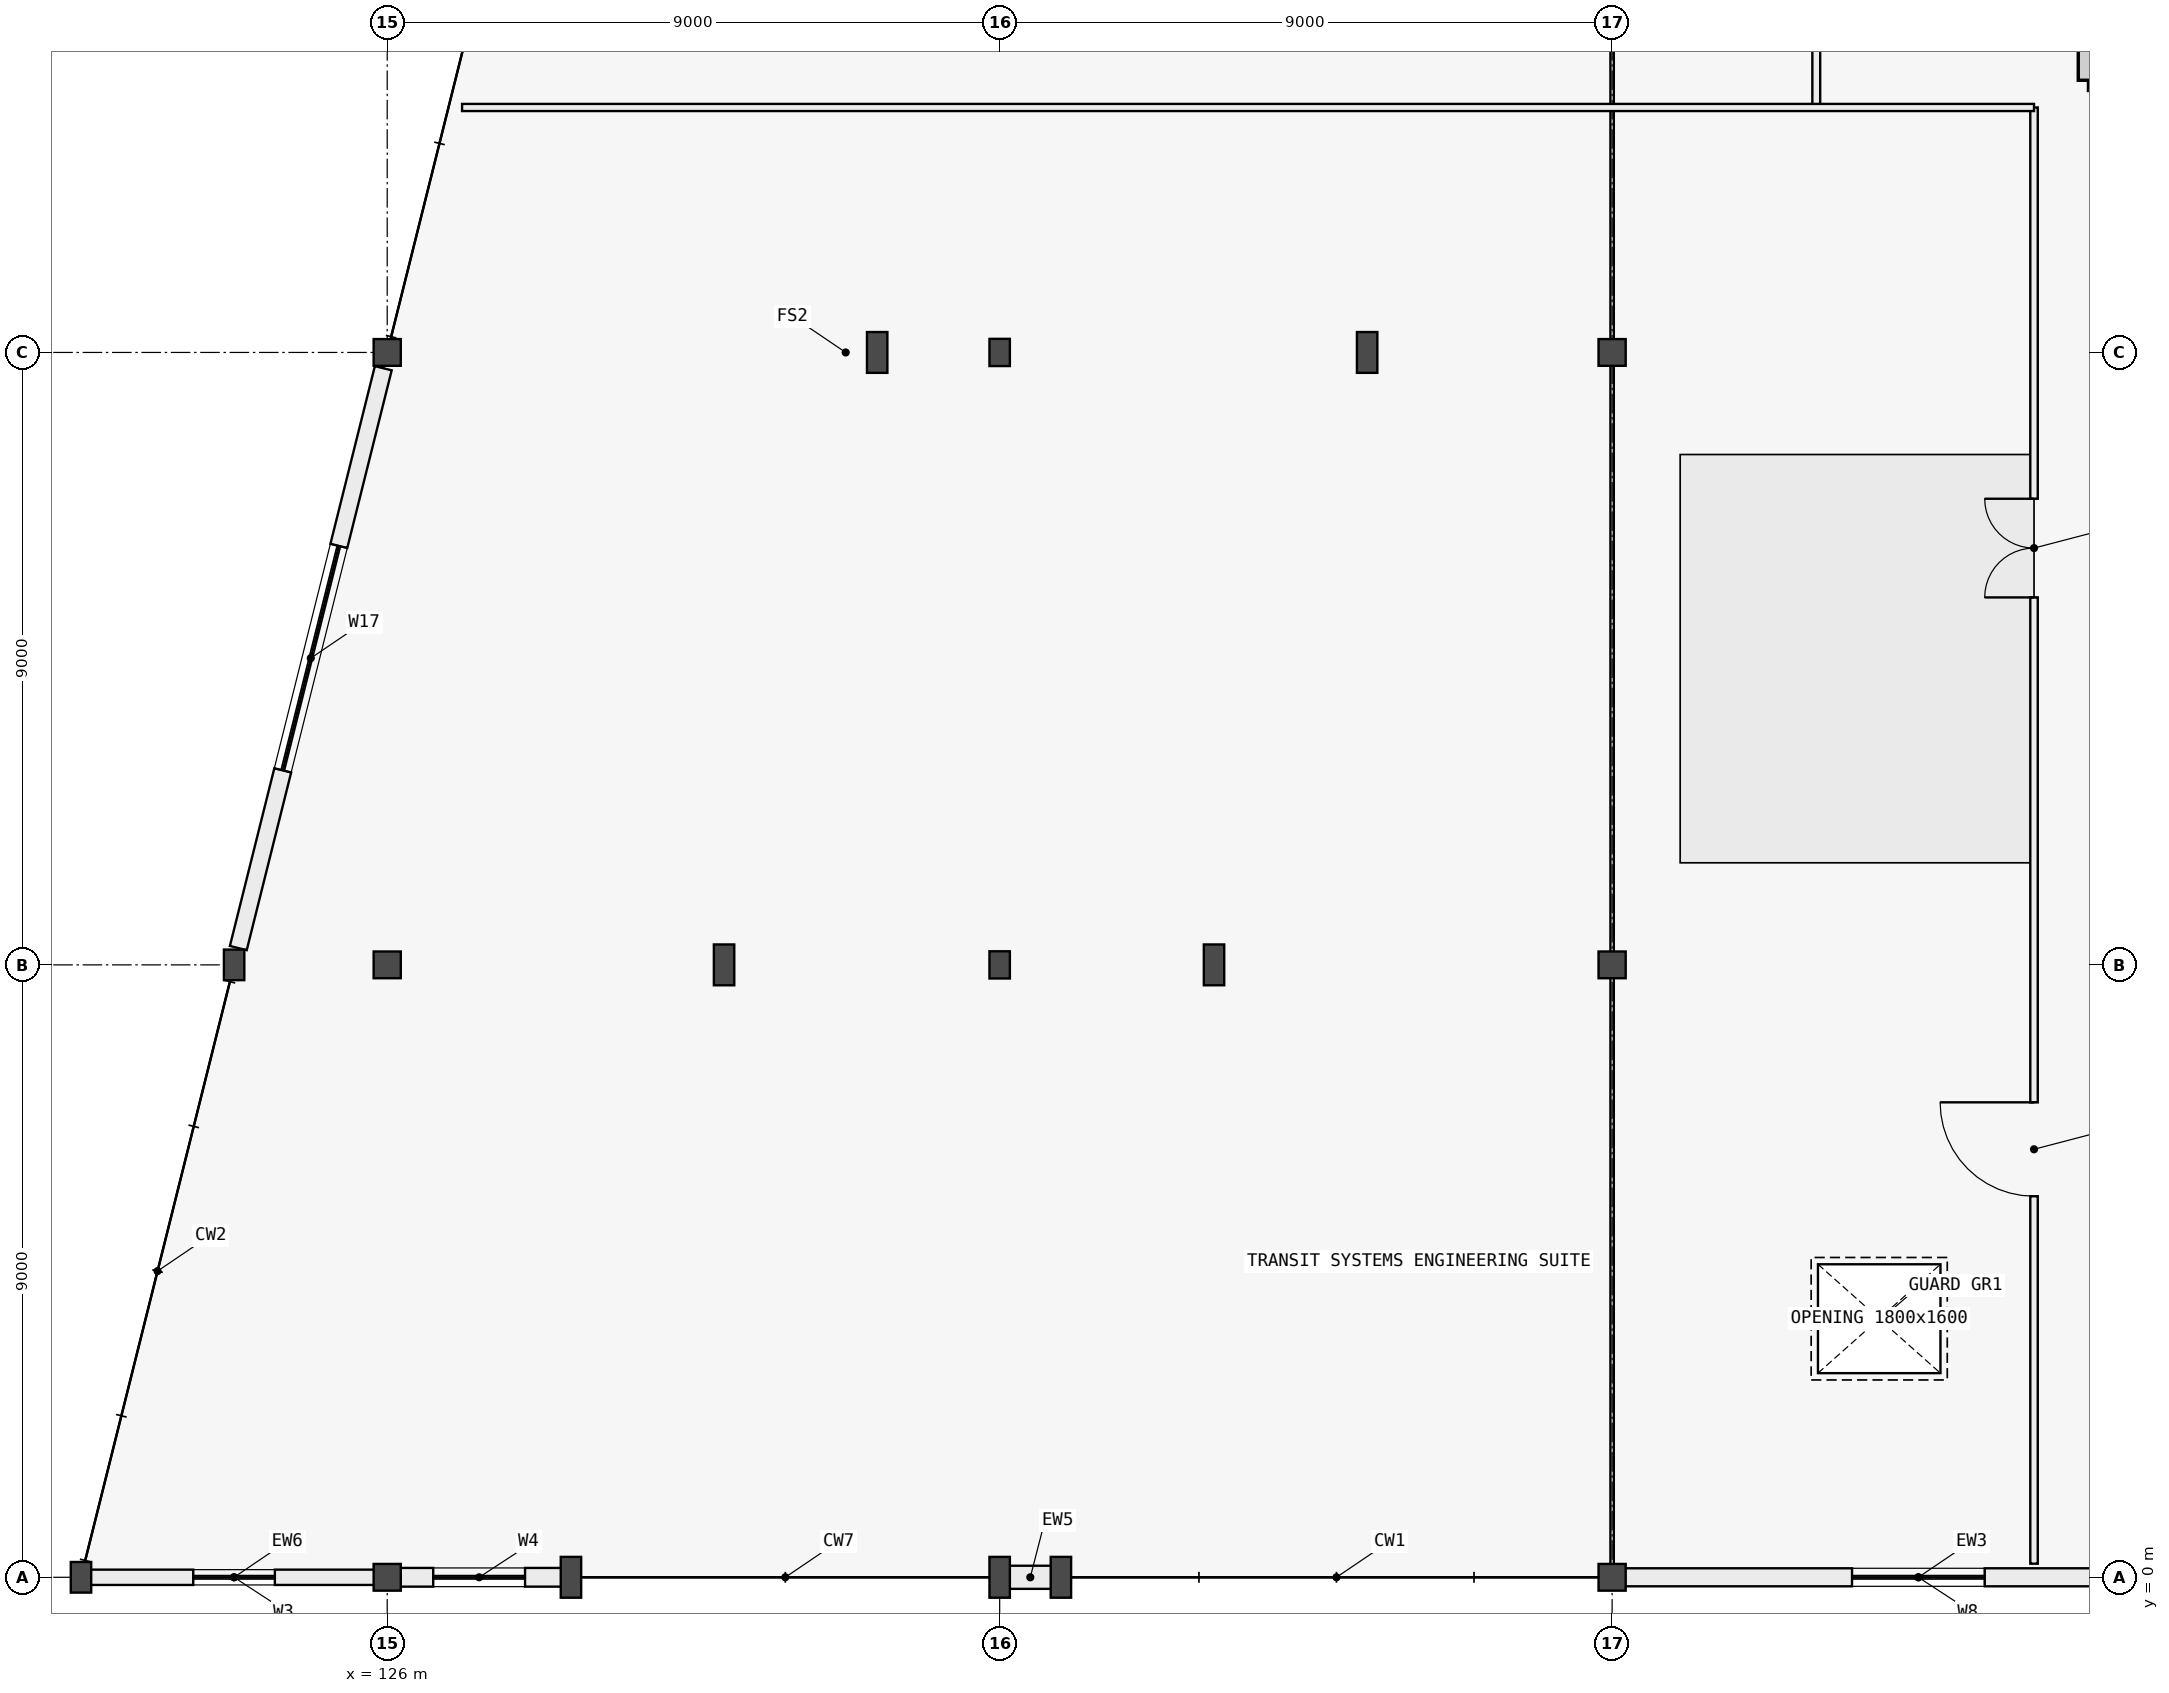
"""IFC4 building model, lengths in metres.
Left out: names, types, materials, properties, quantities, classifications, styles, units other than length and angle.
Written with IfcOpenShell. Run it as: python <this file> out.ifc"""

import sys

from ifc_helpers import new_model, si_unit, direction, frame, frame_2d, origin, origin_2d, place, context, subcontext, project, spatial, rectangle, i_section, extrude, element, fill, save


model = new_model("IFC4")
c1 = context("Model", 3, precision=1e-05, world=origin(), true_north=direction((0.0, 1.0)))
c2 = subcontext(c1, "Body", "Model", "MODEL_VIEW")
j1 = project(units=[si_unit("LENGTHUNIT", "METRE"), si_unit("PLANEANGLEUNIT", "RADIAN")], contexts=[c1])
p1 = place(None, origin())
s1 = spatial("IfcSite", under=j1, at=p1, CompositionType="ELEMENT")
p2 = place(p1, origin())
s2 = spatial("IfcBuilding", under=s1, at=p2, CompositionType="ELEMENT")
p3 = place(p2, frame((0.0, 0.0, 16.8)))
s3 = spatial("IfcBuildingStorey", under=s2, at=p3, CompositionType="ELEMENT", Elevation=16.8)
p4 = place(p3, frame((121.5, 0.0, 0.0), z_axis=(0.0, 0.0, 1.0), x_axis=(1.0, 0.0, 0.0)))
e1 = element("IfcColumn", 1, at=p4, inside=s3, PredefinedType="COLUMN", context=c2, shape_type="SweptSolid", body=[
    extrude(i_section(OverallWidth=0.3, OverallDepth=0.45, WebThickness=0.014, FlangeThickness=0.026, FilletRadius=0.027, at=origin_2d()), origin(), (0.0, 0.0, 1.0), 4.2),
])
p5 = place(p3, frame((126.0, 0.0, 0.0), z_axis=(0.0, 0.0, 1.0), x_axis=(1.0, 0.0, 0.0)))
e2 = element("IfcColumn", 2, at=p5, inside=s3, PredefinedType="COLUMN", context=c2, shape_type="SweptSolid", body=[
    extrude(i_section(OverallWidth=0.399, OverallDepth=0.393, WebThickness=0.018, FlangeThickness=0.028, FilletRadius=0.015, at=origin_2d()), origin(), (0.0, 0.0, 1.0), 4.2),
])
for number, where, z_axis, x_axis in (
    (3, (128.7, 0.0, 0.0), (0.0, 0.0, 1.0), (1.0, 0.0, 0.0)),
    (4, (135.0, 0.0, 0.0), (0.0, 0.0, 1.0), (1.0, 0.0, 0.0)),
    (5, (135.9, 0.0, 0.0), (0.0, 0.0, 1.0), (1.0, 0.0, 0.0)),
):
    element("IfcColumn", number, at=place(p3, frame(where, z_axis=z_axis, x_axis=x_axis)), inside=s3, PredefinedType="COLUMN", context=c2, shape_type="SweptSolid", body=[
        extrude(i_section(OverallWidth=0.3, OverallDepth=0.6, WebThickness=0.015, FlangeThickness=0.03, FilletRadius=0.027, at=origin_2d()), origin(), (0.0, 0.0, 1.0), 4.2),
    ])
p6 = place(p3, frame((144.0, 0.0, 0.0), z_axis=(0.0, 0.0, 1.0), x_axis=(1.0, 0.0, 0.0)))
e6 = element("IfcColumn", 6, at=p6, inside=s3, PredefinedType="COLUMN", context=c2, shape_type="SweptSolid", body=[
    extrude(i_section(OverallWidth=0.399, OverallDepth=0.393, WebThickness=0.018, FlangeThickness=0.028, FilletRadius=0.015, at=origin_2d()), origin(), (0.0, 0.0, 1.0), 4.2),
])
p7 = place(p3, frame((123.75, 9.0, 0.0), z_axis=(0.0, 0.0, 1.0), x_axis=(1.0, 0.0, 0.0)))
e7 = element("IfcColumn", 7, at=p7, inside=s3, PredefinedType="COLUMN", context=c2, shape_type="SweptSolid", body=[
    extrude(i_section(OverallWidth=0.3, OverallDepth=0.45, WebThickness=0.014, FlangeThickness=0.026, FilletRadius=0.027, at=origin_2d()), origin(), (0.0, 0.0, 1.0), 4.2),
])
p8 = place(p3, frame((126.0, 9.0, 0.0), z_axis=(0.0, 0.0, 1.0), x_axis=(1.0, 0.0, 0.0)))
e8 = element("IfcColumn", 8, at=p8, inside=s3, PredefinedType="COLUMN", context=c2, shape_type="SweptSolid", body=[
    extrude(i_section(OverallWidth=0.399, OverallDepth=0.393, WebThickness=0.018, FlangeThickness=0.028, FilletRadius=0.015, at=origin_2d()), origin(), (0.0, 0.0, 1.0), 4.2),
])
p9 = place(p3, frame((130.95, 9.0, 0.0), z_axis=(0.0, 0.0, 1.0), x_axis=(1.0, 0.0, 0.0)))
e9 = element("IfcColumn", 9, at=p9, inside=s3, PredefinedType="COLUMN", context=c2, shape_type="SweptSolid", body=[
    extrude(i_section(OverallWidth=0.3, OverallDepth=0.6, WebThickness=0.015, FlangeThickness=0.03, FilletRadius=0.027, at=origin_2d()), origin(), (0.0, 0.0, 1.0), 4.2),
])
p10 = place(p3, frame((135.0, 9.0, 0.0), z_axis=(0.0, 0.0, 1.0), x_axis=(1.0, 0.0, 0.0)))
e10 = element("IfcColumn", 10, at=p10, inside=s3, PredefinedType="COLUMN", context=c2, shape_type="SweptSolid", body=[
    extrude(i_section(OverallWidth=0.3, OverallDepth=0.4, WebThickness=0.013, FlangeThickness=0.024, FilletRadius=0.027, at=origin_2d()), origin(), (0.0, 0.0, 1.0), 4.2),
])
p11 = place(p3, frame((138.15, 9.0, 0.0), z_axis=(0.0, 0.0, 1.0), x_axis=(1.0, 0.0, 0.0)))
e11 = element("IfcColumn", 11, at=p11, inside=s3, PredefinedType="COLUMN", context=c2, shape_type="SweptSolid", body=[
    extrude(i_section(OverallWidth=0.3, OverallDepth=0.6, WebThickness=0.015, FlangeThickness=0.03, FilletRadius=0.027, at=origin_2d()), origin(), (0.0, 0.0, 1.0), 4.2),
])
for number, where, z_axis, x_axis in (
    (12, (144.0, 9.0, 0.0), (0.0, 0.0, 1.0), (1.0, 0.0, 0.0)),
    (13, (126.0, 18.0, 0.0), (0.0, 0.0, 1.0), (1.0, 0.0, 0.0)),
):
    element("IfcColumn", number, at=place(p3, frame(where, z_axis=z_axis, x_axis=x_axis)), inside=s3, PredefinedType="COLUMN", context=c2, shape_type="SweptSolid", body=[
        extrude(i_section(OverallWidth=0.399, OverallDepth=0.393, WebThickness=0.018, FlangeThickness=0.028, FilletRadius=0.015, at=origin_2d()), origin(), (0.0, 0.0, 1.0), 4.2),
    ])
p12 = place(p3, frame((133.2, 18.0, 0.0), z_axis=(0.0, 0.0, 1.0), x_axis=(1.0, 0.0, 0.0)))
e14 = element("IfcColumn", 14, at=p12, inside=s3, PredefinedType="COLUMN", context=c2, shape_type="SweptSolid", body=[
    extrude(i_section(OverallWidth=0.3, OverallDepth=0.6, WebThickness=0.015, FlangeThickness=0.03, FilletRadius=0.027, at=origin_2d()), origin(), (0.0, 0.0, 1.0), 4.2),
])
p13 = place(p3, frame((135.0, 18.0, 0.0), z_axis=(0.0, 0.0, 1.0), x_axis=(1.0, 0.0, 0.0)))
e15 = element("IfcColumn", 15, at=p13, inside=s3, PredefinedType="COLUMN", context=c2, shape_type="SweptSolid", body=[
    extrude(i_section(OverallWidth=0.3, OverallDepth=0.4, WebThickness=0.013, FlangeThickness=0.024, FilletRadius=0.027, at=origin_2d()), origin(), (0.0, 0.0, 1.0), 4.2),
])
p14 = place(p3, frame((140.4, 18.0, 0.0), z_axis=(0.0, 0.0, 1.0), x_axis=(1.0, 0.0, 0.0)))
e16 = element("IfcColumn", 16, at=p14, inside=s3, PredefinedType="COLUMN", context=c2, shape_type="SweptSolid", body=[
    extrude(i_section(OverallWidth=0.3, OverallDepth=0.6, WebThickness=0.015, FlangeThickness=0.03, FilletRadius=0.027, at=origin_2d()), origin(), (0.0, 0.0, 1.0), 4.2),
])
p15 = place(p3, frame((144.0, 18.0, 0.0), z_axis=(0.0, 0.0, 1.0), x_axis=(1.0, 0.0, 0.0)))
e17 = element("IfcColumn", 17, at=p15, inside=s3, PredefinedType="COLUMN", context=c2, shape_type="SweptSolid", body=[
    extrude(i_section(OverallWidth=0.399, OverallDepth=0.393, WebThickness=0.018, FlangeThickness=0.028, FilletRadius=0.015, at=origin_2d()), origin(), (0.0, 0.0, 1.0), 4.2),
])
p16 = place(p3, frame((121.507, 0.0, 0.0), z_axis=(0.0, 0.0, 1.0), x_axis=(1.0, 0.0, 0.0)))
e18 = element("IfcWall", 18, at=p16, inside=s3, PredefinedType="STANDARD", context=c2, shape_type="SweptSolid", body=[
    extrude(rectangle(XDim=4.484, YDim=0.225, at=frame_2d((2.242, 0.0))), origin(), (0.0, 0.0, 1.0), 3.665),
])
p17 = place(p16, frame((1.642, 0.0, 0.95)))
e19 = element("IfcOpeningElement", 19, at=p17, cuts=e18, PredefinedType="OPENING", context=c2, shape_type="SweptSolid", body=[
    extrude(rectangle(XDim=1.2, YDim=1.35, at=frame_2d((0.6, 0.675))), frame((0.0, 0.123, 0.0), z_axis=(0.0, -1.0, 0.0), x_axis=(1.0, 0.0, 0.0)), (0.0, 0.0, 1.0), 0.245),
])
p18 = place(p3, frame((126.009, 0.0, 0.0), z_axis=(0.0, 0.0, 1.0), x_axis=(1.0, 0.0, 0.0)))
e20 = element("IfcWall", 20, at=p18, inside=s3, PredefinedType="POLYGONAL", context=c2, shape_type="SweptSolid", body=[
    extrude(rectangle(XDim=2.684, YDim=0.275, at=frame_2d((1.342, 0.0))), origin(), (0.0, 0.0, 1.0), 3.66),
])
p19 = place(p18, frame((0.667, 0.0, 0.95)))
e21 = element("IfcOpeningElement", 21, at=p19, cuts=e20, PredefinedType="OPENING", context=c2, shape_type="SweptSolid", body=[
    extrude(rectangle(XDim=1.35, YDim=1.4, at=frame_2d((0.675, 0.7))), frame((0.0, 0.147, 0.0), z_axis=(0.0, -1.0, 0.0), x_axis=(1.0, 0.0, 0.0)), (0.0, 0.0, 1.0), 0.295),
])
p20 = place(p3, frame((135.008, 0.0, 0.0), z_axis=(0.0, 0.0, 1.0), x_axis=(1.0, 0.0, 0.0)))
e22 = element("IfcWall", 22, at=p20, inside=s3, PredefinedType="STANDARD", context=c2, shape_type="SweptSolid", body=[
    extrude(rectangle(XDim=0.885, YDim=0.34, at=frame_2d((0.442, 0.0))), origin(), (0.0, 0.0, 1.0), 3.66),
])
p21 = place(p3, frame((144.009, 0.0, 0.0), z_axis=(0.0, 0.0, 1.0), x_axis=(1.0, 0.0, 0.0)))
e23 = element("IfcWall", 23, at=p21, inside=s3, PredefinedType="STANDARD", context=c2, shape_type="SweptSolid", body=[
    extrude(rectangle(XDim=8.983, YDim=0.265, at=frame_2d((4.492, 0.0))), origin(), (0.0, 0.0, 1.0), 3.63),
])
p22 = place(p21, frame((3.517, 0.0, 0.95)))
e24 = element("IfcOpeningElement", 24, at=p22, cuts=e23, PredefinedType="OPENING", context=c2, shape_type="SweptSolid", body=[
    extrude(rectangle(XDim=1.95, YDim=1.65, at=frame_2d((0.975, 0.825))), frame((0.0, 0.143, 0.0), z_axis=(0.0, -1.0, 0.0), x_axis=(1.0, 0.0, 0.0)), (0.0, 0.0, 1.0), 0.285),
])
p23 = place(p3, frame((123.812, 9.247, 0.0), z_axis=(0.0, 0.0, 1.0), x_axis=(0.242522544412, 0.970145770208, 0.0)))
e25 = element("IfcWall", 25, at=p23, inside=s3, PredefinedType="POLYGONAL", context=c2, shape_type="SweptSolid", body=[
    extrude(rectangle(XDim=8.783, YDim=0.255, at=frame_2d((4.392, 0.0))), origin(), (0.0, 0.0, 1.0), 3.485),
])
p24 = place(p23, frame((2.692, 0.0, 0.95)))
e26 = element("IfcOpeningElement", 26, at=p24, cuts=e25, PredefinedType="OPENING", context=c2, shape_type="SweptSolid", body=[
    extrude(rectangle(XDim=3.4, YDim=1.55, at=frame_2d((1.7, 0.775))), frame((0.0, 0.137, 0.0), z_axis=(0.0, -1.0, 0.0), x_axis=(1.0, 0.0, 0.0)), (0.0, 0.0, 1.0), 0.275),
])
p25 = place(p3, frame((151.0, 22.0, 0.0), z_axis=(0.0, 0.0, 1.0), x_axis=(1.0, 0.0, 0.0)))
e27 = element("IfcWall", 27, at=p25, inside=s3, PredefinedType="SHEAR", context=c2, shape_type="SweptSolid", body=[
    extrude(rectangle(XDim=10.2, YDim=0.3, at=frame_2d((5.1, 0.0))), origin(), (0.0, 0.0, 1.0), 3.955),
])
p26 = place(p25, frame((4.75, 0.0, 0.0)))
e28 = element("IfcOpeningElement", 28, at=p26, cuts=e27, PredefinedType="OPENING", context=c2, shape_type="SweptSolid", body=[
    extrude(rectangle(XDim=1.2, YDim=2.15, at=frame_2d((0.6, 1.075))), frame((0.0, 0.16, 0.0), z_axis=(0.0, -1.0, 0.0), x_axis=(1.0, 0.0, 0.0)), (0.0, 0.0, 1.0), 0.32),
])
p27 = place(p3, frame((151.0, 30.2, 0.0), z_axis=(0.0, 0.0, 1.0), x_axis=(0.0, -1.0, 0.0)))
e29 = element("IfcWall", 29, at=p27, inside=s3, PredefinedType="SHEAR", context=c2, shape_type="SweptSolid", body=[
    extrude(rectangle(XDim=8.2, YDim=0.3, at=frame_2d((4.1, 0.0))), origin(), (0.0, 0.0, 1.0), 3.955),
])
p28 = place(p3, frame((150.2, 0.2, 0.0), z_axis=(0.0, 0.0, 1.0), x_axis=(0.0, 1.0, 0.0)))
e30 = element("IfcWall", 30, at=p28, inside=s3, PredefinedType="PARTITIONING", context=c2, shape_type="SweptSolid", body=[
    extrude(rectangle(XDim=21.4, YDim=0.11, at=frame_2d((10.7, 0.0))), origin(), (0.0, 0.0, 1.0), 3.66),
])
p29 = place(p28, frame((5.4, 0.0, 0.0)))
e31 = element("IfcOpeningElement", 31, at=p29, cuts=e30, PredefinedType="OPENING", context=c2, shape_type="SweptSolid", body=[
    extrude(rectangle(XDim=1.38, YDim=2.2, at=frame_2d((0.69, 1.1))), frame((0.0, 0.065, 0.0), z_axis=(0.0, -1.0, 0.0), x_axis=(1.0, 0.0, 0.0)), (0.0, 0.0, 1.0), 0.13),
])
p30 = place(p28, frame((14.2, 0.0, 0.0)))
e32 = element("IfcOpeningElement", 32, at=p30, cuts=e30, PredefinedType="OPENING", context=c2, shape_type="SweptSolid", body=[
    extrude(rectangle(XDim=1.45, YDim=2.22, at=frame_2d((0.725, 1.11))), frame((0.0, 0.065, 0.0), z_axis=(0.0, -1.0, 0.0), x_axis=(1.0, 0.0, 0.0)), (0.0, 0.0, 1.0), 0.13),
])
p31 = place(p3, frame((147.0, 21.6, 0.0), z_axis=(0.0, 0.0, 1.0), x_axis=(0.0, 1.0, 0.0)))
e33 = element("IfcWall", 33, at=p31, inside=s3, PredefinedType="MOVABLE", context=c2, shape_type="SweptSolid", body=[
    extrude(rectangle(XDim=14.6, YDim=0.115, at=frame_2d((7.3, 0.0))), origin(), (0.0, 0.0, 1.0), 3.955),
])
p32 = place(p31, frame((6.5, 0.0, 0.0)))
e34 = element("IfcOpeningElement", 34, at=p32, cuts=e33, PredefinedType="OPENING", context=c2, shape_type="SweptSolid", body=[
    extrude(rectangle(XDim=1.65, YDim=2.25, at=frame_2d((0.825, 1.125))), frame((0.0, 0.067, 0.0), z_axis=(0.0, -1.0, 0.0), x_axis=(1.0, 0.0, 0.0)), (0.0, 0.0, 1.0), 0.135),
])
p33 = place(p3, frame((127.1, 21.6, 0.0), z_axis=(0.0, 0.0, 1.0), x_axis=(1.0, 0.0, 0.0)))
e35 = element("IfcWall", 35, at=p33, inside=s3, PredefinedType="MOVABLE", context=c2, shape_type="SweptSolid", body=[
    extrude(rectangle(XDim=23.1, YDim=0.105, at=frame_2d((11.55, 0.0))), origin(), (0.0, 0.0, 1.0), 3.955),
])
p34 = place(p17, origin())
e36 = element("IfcWindow", 36, at=p34, inside=s3, PartitioningType="SINGLE_PANEL", PredefinedType="WINDOW", context=c2, shape_type="SweptSolid", body=[
    extrude(rectangle(XDim=1.2, YDim=1.35, at=frame_2d((0.6, 0.675))), frame((0.0, 0.03, 0.0), z_axis=(0.0, -1.0, 0.0), x_axis=(1.0, 0.0, 0.0)), (0.0, 0.0, 1.0), 0.06),
])
fill(e19, e36)
p35 = place(p19, origin())
e37 = element("IfcWindow", 37, at=p35, inside=s3, PartitioningType="SINGLE_PANEL", PredefinedType="WINDOW", context=c2, shape_type="SweptSolid", body=[
    extrude(rectangle(XDim=1.35, YDim=1.4, at=frame_2d((0.675, 0.7))), frame((0.0, 0.03, 0.0), z_axis=(0.0, -1.0, 0.0), x_axis=(1.0, 0.0, 0.0)), (0.0, 0.0, 1.0), 0.06),
])
fill(e21, e37)
p36 = place(p22, origin())
e38 = element("IfcWindow", 38, at=p36, inside=s3, PartitioningType="SINGLE_PANEL", PredefinedType="WINDOW", context=c2, shape_type="SweptSolid", body=[
    extrude(rectangle(XDim=1.95, YDim=1.65, at=frame_2d((0.975, 0.825))), frame((0.0, 0.03, 0.0), z_axis=(0.0, -1.0, 0.0), x_axis=(1.0, 0.0, 0.0)), (0.0, 0.0, 1.0), 0.06),
])
fill(e24, e38)
p37 = place(p24, origin())
e39 = element("IfcWindow", 39, at=p37, inside=s3, PartitioningType="SINGLE_PANEL", PredefinedType="WINDOW", context=c2, shape_type="SweptSolid", body=[
    extrude(rectangle(XDim=3.4, YDim=1.55, at=frame_2d((1.7, 0.775))), frame((0.0, 0.03, 0.0), z_axis=(0.0, -1.0, 0.0), x_axis=(1.0, 0.0, 0.0)), (0.0, 0.0, 1.0), 0.06),
])
fill(e26, e39)
p38 = place(p29, origin())
e40 = element("IfcDoor", 40, at=p38, inside=s3, OperationType="SINGLE_SWING_RIGHT", PredefinedType="DOOR", context=c2, shape_type="SweptSolid", body=[
    extrude(rectangle(XDim=1.38, YDim=2.2, at=frame_2d((0.69, 1.1))), frame((0.0, 0.025, 0.0), z_axis=(0.0, -1.0, 0.0), x_axis=(1.0, 0.0, 0.0)), (0.0, 0.0, 1.0), 0.05),
])
fill(e31, e40)
p39 = place(p30, origin())
e41 = element("IfcDoor", 41, at=p39, inside=s3, OperationType="DOUBLE_DOOR_SINGLE_SWING", PredefinedType="DOOR", context=c2, shape_type="SweptSolid", body=[
    extrude(rectangle(XDim=1.45, YDim=2.22, at=frame_2d((0.725, 1.11))), frame((0.0, 0.025, 0.0), z_axis=(0.0, -1.0, 0.0), x_axis=(1.0, 0.0, 0.0)), (0.0, 0.0, 1.0), 0.05),
])
fill(e32, e41)
save(model, sys.argv[1])
